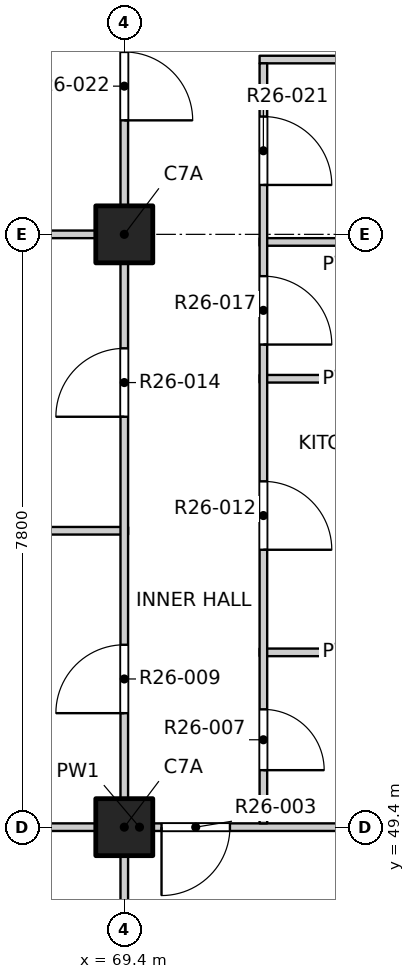
"""IFC4 building model, lengths in metres.
Left out: names, types, materials, properties, quantities, classifications, styles, units other than length and angle.
Written with IfcOpenShell. Run it as: python <this file> out.ifc"""

import sys

from ifc_helpers import new_model, si_unit, direction, frame, frame_2d, origin, origin_2d, place, context, subcontext, project, spatial, rectangle, extrude, element, fill, save


model = new_model("IFC4")
c1 = context("Model", 3, precision=1e-05, world=origin(), true_north=direction((0.0, 1.0)))
c2 = subcontext(c1, "Body", "Model", "MODEL_VIEW")
j1 = project(units=[si_unit("LENGTHUNIT", "METRE"), si_unit("PLANEANGLEUNIT", "RADIAN")], contexts=[c1])
p1 = place(None, origin())
s1 = spatial("IfcSite", under=j1, at=p1, CompositionType="ELEMENT")
p2 = place(p1, origin())
s2 = spatial("IfcBuilding", under=s1, at=p2, CompositionType="ELEMENT")
p3 = place(p2, frame((0.0, 0.0, 259.6)))
s3 = spatial("IfcBuildingStorey", under=s2, at=p3, CompositionType="ELEMENT", Elevation=259.6)
for number, where, z_axis, x_axis in (
    (1, (69.4, 49.4, -0.25), (0.0, 0.0, 1.0), (1.0, 0.0, 0.0)),
    (2, (69.4, 57.2, -0.25), (0.0, 0.0, 1.0), (1.0, 0.0, 0.0)),
):
    element("IfcColumn", number, at=place(p3, frame(where, z_axis=z_axis, x_axis=x_axis)), inside=s3, PredefinedType="COLUMN", context=c2, shape_type="SweptSolid", body=[
        extrude(rectangle(XDim=0.75, YDim=0.75, at=origin_2d()), origin(), (0.0, 0.0, 1.0), 3.4),
    ])
p4 = place(p3, frame((65.8, 49.4, 0.0), z_axis=(0.0, 0.0, 1.0), x_axis=(1.0, 0.0, 0.0)))
e3 = element("IfcWall", 3, at=p4, inside=s3, PredefinedType="PARTITIONING", context=c2, shape_type="SweptSolid", body=[
    extrude(rectangle(XDim=7.6, YDim=0.1, at=frame_2d((3.8, 0.0))), origin(), (0.0, 0.0, 1.0), 3.15),
])
p5 = place(p4, frame((4.09, 0.0, 0.0)))
e4 = element("IfcOpeningElement", 4, at=p5, cuts=e3, PredefinedType="OPENING", context=c2, shape_type="SweptSolid", body=[
    extrude(rectangle(XDim=0.9, YDim=2.1, at=frame_2d((0.45, 1.05))), frame((0.0, 0.06, 0.0), z_axis=(0.0, -1.0, 0.0), x_axis=(1.0, 0.0, 0.0)), (0.0, 0.0, 1.0), 0.12),
])
p6 = place(p3, frame((71.18, 51.7, 0.0), z_axis=(0.0, 0.0, 1.0), x_axis=(1.0, 0.0, 0.0)))
e5 = element("IfcWall", 5, at=p6, inside=s3, PredefinedType="PARTITIONING", context=c2, shape_type="SweptSolid", body=[
    extrude(rectangle(XDim=2.22, YDim=0.1, at=frame_2d((1.11, 0.0))), origin(), (0.0, 0.0, 1.0), 3.15),
])
p7 = place(p3, frame((65.8, 53.3, 0.0), z_axis=(0.0, 0.0, 1.0), x_axis=(1.0, 0.0, 0.0)))
e6 = element("IfcWall", 6, at=p7, inside=s3, PredefinedType="PARTITIONING", context=c2, shape_type="SweptSolid", body=[
    extrude(rectangle(XDim=3.65, YDim=0.1, at=frame_2d((1.825, 0.0))), origin(), (0.0, 0.0, 1.0), 3.15),
])
for number, where, z_axis, x_axis in (
    (7, (71.18, 55.3, 0.0), (0.0, 0.0, 1.0), (1.0, 0.0, 0.0)),
    (8, (71.18, 57.1, 0.0), (0.0, 0.0, 1.0), (1.0, 0.0, 0.0)),
):
    element("IfcWall", number, at=place(p3, frame(where, z_axis=z_axis, x_axis=x_axis)), inside=s3, PredefinedType="PARTITIONING", context=c2, shape_type="SweptSolid", body=[
        extrude(rectangle(XDim=2.22, YDim=0.1, at=frame_2d((1.11, 0.0))), origin(), (0.0, 0.0, 1.0), 3.15),
    ])
p8 = place(p3, frame((65.8, 57.2, 0.0), z_axis=(0.0, 0.0, 1.0), x_axis=(1.0, 0.0, 0.0)))
e9 = element("IfcWall", 9, at=p8, inside=s3, PredefinedType="PARTITIONING", context=c2, shape_type="SweptSolid", body=[
    extrude(rectangle(XDim=3.65, YDim=0.1, at=frame_2d((1.825, 0.0))), origin(), (0.0, 0.0, 1.0), 3.15),
])
p9 = place(p3, frame((71.18, 59.5, 0.0), z_axis=(0.0, 0.0, 1.0), x_axis=(1.0, 0.0, 0.0)))
e10 = element("IfcWall", 10, at=p9, inside=s3, PredefinedType="PARTITIONING", context=c2, shape_type="SweptSolid", body=[
    extrude(rectangle(XDim=2.22, YDim=0.1, at=frame_2d((1.11, 0.0))), origin(), (0.0, 0.0, 1.0), 3.15),
])
p10 = place(p3, frame((69.4, 45.8, 0.0), z_axis=(0.0, 0.0, 1.0), x_axis=(0.0, 1.0, 0.0)))
e11 = element("IfcWall", 11, at=p10, inside=s3, PredefinedType="PARTITIONING", context=c2, shape_type="SweptSolid", body=[
    extrude(rectangle(XDim=38.4, YDim=0.1, at=frame_2d((19.2, 0.0))), origin(), (0.0, 0.0, 1.0), 3.15),
])
p11 = place(p10, frame((1.05, 0.0, 0.0)))
e12 = element("IfcOpeningElement", 12, at=p11, cuts=e11, PredefinedType="OPENING", context=c2, shape_type="SweptSolid", body=[
    extrude(rectangle(XDim=1.2, YDim=2.1, at=frame_2d((0.6, 1.05))), frame((0.0, 0.06, 0.0), z_axis=(0.0, -1.0, 0.0), x_axis=(1.0, 0.0, 0.0)), (0.0, 0.0, 1.0), 0.12),
])
p12 = place(p10, frame((5.1, 0.0, 0.0)))
e13 = element("IfcOpeningElement", 13, at=p12, cuts=e11, PredefinedType="OPENING", context=c2, shape_type="SweptSolid", body=[
    extrude(rectangle(XDim=0.9, YDim=2.1, at=frame_2d((0.45, 1.05))), frame((0.0, 0.06, 0.0), z_axis=(0.0, -1.0, 0.0), x_axis=(1.0, 0.0, 0.0)), (0.0, 0.0, 1.0), 0.12),
])
p13 = place(p10, frame((9.0, 0.0, 0.0)))
e14 = element("IfcOpeningElement", 14, at=p13, cuts=e11, PredefinedType="OPENING", context=c2, shape_type="SweptSolid", body=[
    extrude(rectangle(XDim=0.9, YDim=2.1, at=frame_2d((0.45, 1.05))), frame((0.0, 0.06, 0.0), z_axis=(0.0, -1.0, 0.0), x_axis=(1.0, 0.0, 0.0)), (0.0, 0.0, 1.0), 0.12),
])
p14 = place(p10, frame((12.9, 0.0, 0.0)))
e15 = element("IfcOpeningElement", 15, at=p14, cuts=e11, PredefinedType="OPENING", context=c2, shape_type="SweptSolid", body=[
    extrude(rectangle(XDim=0.9, YDim=2.1, at=frame_2d((0.45, 1.05))), frame((0.0, 0.06, 0.0), z_axis=(0.0, -1.0, 0.0), x_axis=(1.0, 0.0, 0.0)), (0.0, 0.0, 1.0), 0.12),
])
p15 = place(p10, frame((16.8, 0.0, 0.0)))
e16 = element("IfcOpeningElement", 16, at=p15, cuts=e11, PredefinedType="OPENING", context=c2, shape_type="SweptSolid", body=[
    extrude(rectangle(XDim=0.9, YDim=2.1, at=frame_2d((0.45, 1.05))), frame((0.0, 0.06, 0.0), z_axis=(0.0, -1.0, 0.0), x_axis=(1.0, 0.0, 0.0)), (0.0, 0.0, 1.0), 0.12),
])
p16 = place(p10, frame((20.7, 0.0, 0.0)))
e17 = element("IfcOpeningElement", 17, at=p16, cuts=e11, PredefinedType="OPENING", context=c2, shape_type="SweptSolid", body=[
    extrude(rectangle(XDim=0.9, YDim=2.1, at=frame_2d((0.45, 1.05))), frame((0.0, 0.06, 0.0), z_axis=(0.0, -1.0, 0.0), x_axis=(1.0, 0.0, 0.0)), (0.0, 0.0, 1.0), 0.12),
])
p17 = place(p10, frame((24.6, 0.0, 0.0)))
e18 = element("IfcOpeningElement", 18, at=p17, cuts=e11, PredefinedType="OPENING", context=c2, shape_type="SweptSolid", body=[
    extrude(rectangle(XDim=0.9, YDim=2.1, at=frame_2d((0.45, 1.05))), frame((0.0, 0.06, 0.0), z_axis=(0.0, -1.0, 0.0), x_axis=(1.0, 0.0, 0.0)), (0.0, 0.0, 1.0), 0.12),
])
p18 = place(p10, frame((30.3, 0.0, 0.0)))
e19 = element("IfcOpeningElement", 19, at=p18, cuts=e11, PredefinedType="OPENING", context=c2, shape_type="SweptSolid", body=[
    extrude(rectangle(XDim=1.2, YDim=2.1, at=frame_2d((0.6, 1.05))), frame((0.0, 0.06, 0.0), z_axis=(0.0, -1.0, 0.0), x_axis=(1.0, 0.0, 0.0)), (0.0, 0.0, 1.0), 0.12),
])
p19 = place(p10, frame((36.15, 0.0, 0.0)))
e20 = element("IfcOpeningElement", 20, at=p19, cuts=e11, PredefinedType="OPENING", context=c2, shape_type="SweptSolid", body=[
    extrude(rectangle(XDim=1.2, YDim=2.1, at=frame_2d((0.6, 1.05))), frame((0.0, 0.06, 0.0), z_axis=(0.0, -1.0, 0.0), x_axis=(1.0, 0.0, 0.0)), (0.0, 0.0, 1.0), 0.12),
])
p20 = place(p3, frame((71.23, 49.45, 0.0), z_axis=(0.0, 0.0, 1.0), x_axis=(0.0, 1.0, 0.0)))
e21 = element("IfcWall", 21, at=p20, inside=s3, PredefinedType="PARTITIONING", context=c2, shape_type="SweptSolid", body=[
    extrude(rectangle(XDim=10.0, YDim=0.1, at=frame_2d((5.0, 0.0))), origin(), (0.0, 0.0, 1.0), 3.15),
])
p21 = place(p20, frame((0.7, 0.0, 0.0)))
e22 = element("IfcOpeningElement", 22, at=p21, cuts=e21, PredefinedType="OPENING", context=c2, shape_type="SweptSolid", body=[
    extrude(rectangle(XDim=0.8, YDim=2.1, at=frame_2d((0.4, 1.05))), frame((0.0, 0.06, 0.0), z_axis=(0.0, -1.0, 0.0), x_axis=(1.0, 0.0, 0.0)), (0.0, 0.0, 1.0), 0.12),
])
p22 = place(p20, frame((3.6, 0.0, 0.0)))
e23 = element("IfcOpeningElement", 23, at=p22, cuts=e21, PredefinedType="OPENING", context=c2, shape_type="SweptSolid", body=[
    extrude(rectangle(XDim=0.9, YDim=2.1, at=frame_2d((0.45, 1.05))), frame((0.0, 0.06, 0.0), z_axis=(0.0, -1.0, 0.0), x_axis=(1.0, 0.0, 0.0)), (0.0, 0.0, 1.0), 0.12),
])
p23 = place(p20, frame((6.3, 0.0, 0.0)))
e24 = element("IfcOpeningElement", 24, at=p23, cuts=e21, PredefinedType="OPENING", context=c2, shape_type="SweptSolid", body=[
    extrude(rectangle(XDim=0.9, YDim=2.1, at=frame_2d((0.45, 1.05))), frame((0.0, 0.06, 0.0), z_axis=(0.0, -1.0, 0.0), x_axis=(1.0, 0.0, 0.0)), (0.0, 0.0, 1.0), 0.12),
])
p24 = place(p20, frame((8.4, 0.0, 0.0)))
e25 = element("IfcOpeningElement", 25, at=p24, cuts=e21, PredefinedType="OPENING", context=c2, shape_type="SweptSolid", body=[
    extrude(rectangle(XDim=0.9, YDim=2.1, at=frame_2d((0.45, 1.05))), frame((0.0, 0.06, 0.0), z_axis=(0.0, -1.0, 0.0), x_axis=(1.0, 0.0, 0.0)), (0.0, 0.0, 1.0), 0.12),
])
p25 = place(p5, origin())
e26 = element("IfcDoor", 26, at=p25, inside=s3, OperationType="SINGLE_SWING_RIGHT", PredefinedType="DOOR", context=c2, shape_type="SweptSolid", body=[
    extrude(rectangle(XDim=0.9, YDim=2.1, at=frame_2d((0.45, 1.05))), frame((0.0, 0.025, 0.0), z_axis=(0.0, -1.0, 0.0), x_axis=(1.0, 0.0, 0.0)), (0.0, 0.0, 1.0), 0.05),
])
fill(e4, e26)
p26 = place(p21, origin())
e27 = element("IfcDoor", 27, at=p26, inside=s3, OperationType="SINGLE_SWING_RIGHT", PredefinedType="DOOR", context=c2, shape_type="SweptSolid", body=[
    extrude(rectangle(XDim=0.8, YDim=2.1, at=frame_2d((0.4, 1.05))), frame((0.0, 0.025, 0.0), z_axis=(0.0, -1.0, 0.0), x_axis=(1.0, 0.0, 0.0)), (0.0, 0.0, 1.0), 0.05),
])
fill(e22, e27)
p27 = place(p12, origin())
e28 = element("IfcDoor", 28, at=p27, inside=s3, OperationType="SINGLE_SWING_LEFT", PredefinedType="DOOR", context=c2, shape_type="SweptSolid", body=[
    extrude(rectangle(XDim=0.9, YDim=2.1, at=frame_2d((0.45, 1.05))), frame((0.0, 0.025, 0.0), z_axis=(0.0, -1.0, 0.0), x_axis=(1.0, 0.0, 0.0)), (0.0, 0.0, 1.0), 0.05),
])
fill(e13, e28)
p28 = place(p22, origin())
e29 = element("IfcDoor", 29, at=p28, inside=s3, OperationType="SINGLE_SWING_RIGHT", PredefinedType="DOOR", context=c2, shape_type="SweptSolid", body=[
    extrude(rectangle(XDim=0.9, YDim=2.1, at=frame_2d((0.45, 1.05))), frame((0.0, 0.025, 0.0), z_axis=(0.0, -1.0, 0.0), x_axis=(1.0, 0.0, 0.0)), (0.0, 0.0, 1.0), 0.05),
])
fill(e23, e29)
p29 = place(p13, origin())
e30 = element("IfcDoor", 30, at=p29, inside=s3, OperationType="SINGLE_SWING_LEFT", PredefinedType="DOOR", context=c2, shape_type="SweptSolid", body=[
    extrude(rectangle(XDim=0.9, YDim=2.1, at=frame_2d((0.45, 1.05))), frame((0.0, 0.025, 0.0), z_axis=(0.0, -1.0, 0.0), x_axis=(1.0, 0.0, 0.0)), (0.0, 0.0, 1.0), 0.05),
])
fill(e14, e30)
p30 = place(p23, origin())
e31 = element("IfcDoor", 31, at=p30, inside=s3, OperationType="SINGLE_SWING_RIGHT", PredefinedType="DOOR", context=c2, shape_type="SweptSolid", body=[
    extrude(rectangle(XDim=0.9, YDim=2.1, at=frame_2d((0.45, 1.05))), frame((0.0, 0.025, 0.0), z_axis=(0.0, -1.0, 0.0), x_axis=(1.0, 0.0, 0.0)), (0.0, 0.0, 1.0), 0.05),
])
fill(e24, e31)
p31 = place(p24, origin())
e32 = element("IfcDoor", 32, at=p31, inside=s3, OperationType="SINGLE_SWING_RIGHT", PredefinedType="DOOR", context=c2, shape_type="SweptSolid", body=[
    extrude(rectangle(XDim=0.9, YDim=2.1, at=frame_2d((0.45, 1.05))), frame((0.0, 0.025, 0.0), z_axis=(0.0, -1.0, 0.0), x_axis=(1.0, 0.0, 0.0)), (0.0, 0.0, 1.0), 0.05),
])
fill(e25, e32)
p32 = place(p14, origin())
e33 = element("IfcDoor", 33, at=p32, inside=s3, OperationType="SINGLE_SWING_RIGHT", PredefinedType="DOOR", context=c2, shape_type="SweptSolid", body=[
    extrude(rectangle(XDim=0.9, YDim=2.1, at=frame_2d((0.45, 1.05))), frame((0.0, 0.025, 0.0), z_axis=(0.0, -1.0, 0.0), x_axis=(1.0, 0.0, 0.0)), (0.0, 0.0, 1.0), 0.05),
])
fill(e15, e33)
save(model, sys.argv[1])
